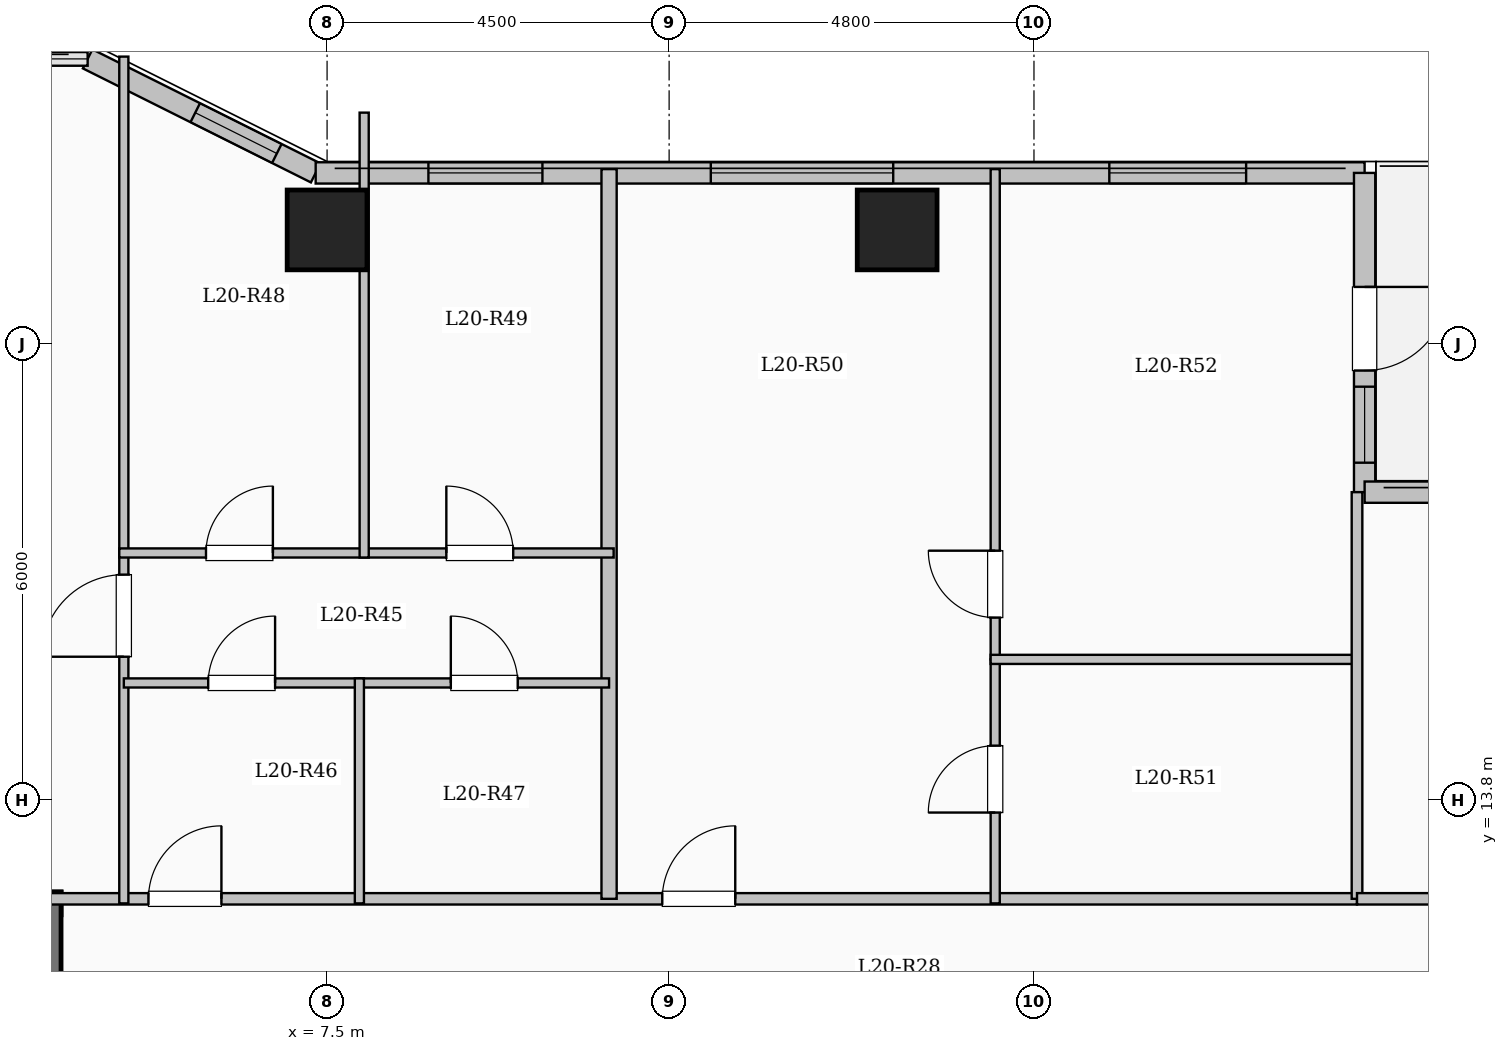
"""IFC4 building model, lengths in metres.
Left out: names, types, materials, properties, quantities, classifications, styles, units other than length and angle.
Written with IfcOpenShell. Run it as: python <this file> out.ifc"""

import sys

from ifc_helpers import new_model, si_unit, direction, frame, frame_2d, origin, origin_2d, place, context, subcontext, project, spatial, rectangle, extrude, element, fill, save


model = new_model("IFC4")
c1 = context("Model", 3, precision=1e-05, world=origin(), true_north=direction((0.0, 1.0)))
c2 = subcontext(c1, "Body", "Model", "MODEL_VIEW")
j1 = project(units=[si_unit("LENGTHUNIT", "METRE"), si_unit("PLANEANGLEUNIT", "RADIAN")], contexts=[c1])
p1 = place(None, origin())
s1 = spatial("IfcSite", under=j1, at=p1, CompositionType="ELEMENT")
p2 = place(p1, origin())
s2 = spatial("IfcBuilding", under=s1, at=p2, CompositionType="ELEMENT")
p3 = place(p2, frame((0.0, 0.0, 78.3)))
s3 = spatial("IfcBuildingStorey", under=s2, at=p3, CompositionType="ELEMENT", Elevation=78.3)
for number, where, z_axis, x_axis in (
    (1, (7.5, 21.3, 0.0), (0.0, 0.0, 1.0), (1.0, 0.0, 0.0)),
    (2, (15.0, 21.3, 0.0), (0.0, 0.0, 1.0), (1.0, 0.0, 0.0)),
):
    element("IfcColumn", number, at=place(p3, frame(where, z_axis=z_axis, x_axis=x_axis)), inside=s3, PredefinedType="COLUMN", context=c2, shape_type="SweptSolid", body=[
        extrude(rectangle(XDim=1.05, YDim=1.05, at=origin_2d()), origin(), (0.0, 0.0, 1.0), 3.35),
    ])
p4 = place(p3, frame((4.35, 23.55, 0.0), z_axis=(0.0, 0.0, 1.0), x_axis=(0.894427191, -0.4472135955, 0.0)))
e3 = element("IfcWall", 3, at=p4, inside=s3, PredefinedType="SOLIDWALL", context=c2, shape_type="SweptSolid", body=[
    extrude(rectangle(XDim=3.354, YDim=0.28, at=frame_2d((1.677, 0.0))), origin(), (0.0, 0.0, 1.0), 3.1),
])
p5 = place(p4, frame((1.583, 0.0, 0.95)))
e4 = element("IfcOpeningElement", 4, at=p5, cuts=e3, PredefinedType="OPENING", context=c2, shape_type="SweptSolid", body=[
    extrude(rectangle(XDim=1.2, YDim=1.5, at=frame_2d((0.6, 0.75))), frame((0.0, 0.15, 0.0), z_axis=(0.0, -1.0, 0.0), x_axis=(1.0, 0.0, 0.0)), (0.0, 0.0, 1.0), 0.3),
])
p6 = place(p3, frame((7.35, 22.05, 0.0), z_axis=(0.0, 0.0, 1.0), x_axis=(1.0, 0.0, 0.0)))
e5 = element("IfcWall", 5, at=p6, inside=s3, PredefinedType="SOLIDWALL", context=c2, shape_type="SweptSolid", body=[
    extrude(rectangle(XDim=13.8, YDim=0.28, at=frame_2d((6.9, 0.0))), origin(), (0.0, 0.0, 1.0), 3.1),
])
p7 = place(p6, frame((1.483, 0.0, 0.9)))
e6 = element("IfcOpeningElement", 6, at=p7, cuts=e5, PredefinedType="OPENING", context=c2, shape_type="SweptSolid", body=[
    extrude(rectangle(XDim=1.5, YDim=1.65, at=frame_2d((0.75, 0.825))), frame((0.0, 0.15, 0.0), z_axis=(0.0, -1.0, 0.0), x_axis=(1.0, 0.0, 0.0)), (0.0, 0.0, 1.0), 0.3),
])
p8 = place(p6, frame((5.198, 0.0, 0.9)))
e7 = element("IfcOpeningElement", 7, at=p8, cuts=e5, PredefinedType="OPENING", context=c2, shape_type="SweptSolid", body=[
    extrude(rectangle(XDim=2.4, YDim=1.8, at=frame_2d((1.2, 0.9))), frame((0.0, 0.15, 0.0), z_axis=(0.0, -1.0, 0.0), x_axis=(1.0, 0.0, 0.0)), (0.0, 0.0, 1.0), 0.3),
])
p9 = place(p6, frame((10.441, 0.0, 0.9)))
e8 = element("IfcOpeningElement", 8, at=p9, cuts=e5, PredefinedType="OPENING", context=c2, shape_type="SweptSolid", body=[
    extrude(rectangle(XDim=1.8, YDim=1.65, at=frame_2d((0.9, 0.825))), frame((0.0, 0.15, 0.0), z_axis=(0.0, -1.0, 0.0), x_axis=(1.0, 0.0, 0.0)), (0.0, 0.0, 1.0), 0.3),
])
p10 = place(p3, frame((21.15, 22.05, 0.0), z_axis=(0.0, 0.0, 1.0), x_axis=(0.0, -1.0, 0.0)))
e9 = element("IfcWall", 9, at=p10, inside=s3, PredefinedType="SOLIDWALL", context=c2, shape_type="SweptSolid", body=[
    extrude(rectangle(XDim=4.2, YDim=0.28, at=frame_2d((2.1, 0.0))), origin(), (0.0, 0.0, 1.0), 3.1),
])
p11 = place(p10, frame((1.5, 0.0, 0.0)))
e10 = element("IfcOpeningElement", 10, at=p11, cuts=e9, PredefinedType="OPENING", context=c2, shape_type="SweptSolid", body=[
    extrude(rectangle(XDim=1.1, YDim=2.2, at=frame_2d((0.55, 1.1))), frame((0.0, 0.15, 0.0), z_axis=(0.0, -1.0, 0.0), x_axis=(1.0, 0.0, 0.0)), (0.0, 0.0, 1.0), 0.3),
])
p12 = place(p10, frame((2.812, 0.0, 0.95)))
e11 = element("IfcOpeningElement", 11, at=p12, cuts=e9, PredefinedType="OPENING", context=c2, shape_type="SweptSolid", body=[
    extrude(rectangle(XDim=1.0, YDim=1.5, at=frame_2d((0.5, 0.75))), frame((0.0, 0.15, 0.0), z_axis=(0.0, -1.0, 0.0), x_axis=(1.0, 0.0, 0.0)), (0.0, 0.0, 1.0), 0.3),
])
p13 = place(p3, frame((21.15, 17.85, 0.0), z_axis=(0.0, 0.0, 1.0), x_axis=(1.0, 0.0, 0.0)))
e12 = element("IfcWall", 12, at=p13, inside=s3, PredefinedType="SOLIDWALL", context=c2, shape_type="SweptSolid", body=[
    extrude(rectangle(XDim=5.7, YDim=0.28, at=frame_2d((2.85, 0.0))), origin(), (0.0, 0.0, 1.0), 3.1),
])
p14 = place(p13, frame((1.825, 0.0, 0.9)))
e13 = element("IfcOpeningElement", 13, at=p14, cuts=e12, PredefinedType="OPENING", context=c2, shape_type="SweptSolid", body=[
    extrude(rectangle(XDim=2.0, YDim=1.7, at=frame_2d((1.0, 0.85))), frame((0.0, 0.15, 0.0), z_axis=(0.0, -1.0, 0.0), x_axis=(1.0, 0.0, 0.0)), (0.0, 0.0, 1.0), 0.3),
])
p15 = place(p3, frame((-4.0, 12.44, 0.0), z_axis=(0.0, 0.0, 1.0), x_axis=(1.0, 0.0, 0.0)))
e14 = element("IfcWall", 14, at=p15, inside=s3, PredefinedType="SHEAR", context=c2, shape_type="SweptSolid", body=[
    extrude(rectangle(XDim=8.0, YDim=0.3, at=frame_2d((4.0, 0.0))), origin(), (0.0, 0.0, 1.0), 3.35),
])
p16 = place(p3, frame((3.85, 9.0, 0.0), z_axis=(0.0, 0.0, 1.0), x_axis=(0.0, 1.0, 0.0)))
e15 = element("IfcWall", 15, at=p16, inside=s3, PredefinedType="SHEAR", context=c2, shape_type="SweptSolid", body=[
    extrude(rectangle(XDim=3.59, YDim=0.3, at=frame_2d((1.795, 0.0))), origin(), (0.0, 0.0, 1.0), 3.35),
])
p17 = place(p3, frame((3.85, 12.5, 0.0), z_axis=(0.0, 0.0, 1.0), x_axis=(1.0, 0.0, 0.0)))
e16 = element("IfcWall", 16, at=p17, inside=s3, PredefinedType="PARTITIONING", context=c2, shape_type="SweptSolid", body=[
    extrude(rectangle(XDim=17.2, YDim=0.15, at=frame_2d((8.6, 0.0))), origin(), (0.0, 0.0, 1.0), 3.1),
])
p18 = place(p17, frame((1.3, 0.0, 0.0)))
e17 = element("IfcOpeningElement", 17, at=p18, cuts=e16, PredefinedType="OPENING", context=c2, shape_type="SweptSolid", body=[
    extrude(rectangle(XDim=0.96, YDim=2.15, at=frame_2d((0.48, 1.075))), frame((0.0, 0.085, 0.0), z_axis=(0.0, -1.0, 0.0), x_axis=(1.0, 0.0, 0.0)), (0.0, 0.0, 1.0), 0.17),
])
p19 = place(p17, frame((8.06, 0.0, 0.0)))
e18 = element("IfcOpeningElement", 18, at=p19, cuts=e16, PredefinedType="OPENING", context=c2, shape_type="SweptSolid", body=[
    extrude(rectangle(XDim=0.96, YDim=2.15, at=frame_2d((0.48, 1.075))), frame((0.0, 0.085, 0.0), z_axis=(0.0, -1.0, 0.0), x_axis=(1.0, 0.0, 0.0)), (0.0, 0.0, 1.0), 0.17),
])
p20 = place(p3, frame((11.21, 12.5, 0.0), z_axis=(0.0, 0.0, 1.0), x_axis=(0.0, 1.0, 0.0)))
e19 = element("IfcWall", 19, at=p20, inside=s3, PredefinedType="SOLIDWALL", context=c2, shape_type="SweptSolid", body=[
    extrude(rectangle(XDim=9.6, YDim=0.2, at=frame_2d((4.8, 0.0))), origin(), (0.0, 0.0, 1.0), 3.1),
])
p21 = place(p3, frame((4.826, 12.44, 0.0), z_axis=(0.0, 0.0, 1.0), x_axis=(0.0, 1.0, 0.0)))
e20 = element("IfcWall", 20, at=p21, inside=s3, PredefinedType="PARTITIONING", context=c2, shape_type="SweptSolid", body=[
    extrude(rectangle(XDim=11.14, YDim=0.12, at=frame_2d((5.57, 0.0))), origin(), (0.0, 0.0, 1.0), 3.1),
])
p22 = place(p21, frame((3.245, 0.0, 0.0)))
e21 = element("IfcOpeningElement", 21, at=p22, cuts=e20, PredefinedType="OPENING", context=c2, shape_type="SweptSolid", body=[
    extrude(rectangle(XDim=1.08, YDim=2.15, at=frame_2d((0.54, 1.075))), frame((0.0, 0.07, 0.0), z_axis=(0.0, -1.0, 0.0), x_axis=(1.0, 0.0, 0.0)), (0.0, 0.0, 1.0), 0.14),
])
p23 = place(p3, frame((4.826, 15.34, 0.0), z_axis=(0.0, 0.0, 1.0), x_axis=(1.0, 0.0, 0.0)))
e22 = element("IfcWall", 22, at=p23, inside=s3, PredefinedType="PARTITIONING", context=c2, shape_type="SweptSolid", body=[
    extrude(rectangle(XDim=3.099, YDim=0.12, at=frame_2d((1.55, 0.0))), origin(), (0.0, 0.0, 1.0), 3.1),
])
p24 = place(p23, frame((1.11, 0.0, 0.0)))
e23 = element("IfcOpeningElement", 23, at=p24, cuts=e22, PredefinedType="OPENING", context=c2, shape_type="SweptSolid", body=[
    extrude(rectangle(XDim=0.88, YDim=2.1, at=frame_2d((0.44, 1.05))), frame((0.0, 0.07, 0.0), z_axis=(0.0, -1.0, 0.0), x_axis=(1.0, 0.0, 0.0)), (0.0, 0.0, 1.0), 0.14),
])
p25 = place(p3, frame((7.925, 15.34, 0.0), z_axis=(0.0, 0.0, 1.0), x_axis=(1.0, 0.0, 0.0)))
e24 = element("IfcWall", 24, at=p25, inside=s3, PredefinedType="PARTITIONING", context=c2, shape_type="SweptSolid", body=[
    extrude(rectangle(XDim=3.285, YDim=0.12, at=frame_2d((1.643, 0.0))), origin(), (0.0, 0.0, 1.0), 3.1),
])
p26 = place(p25, frame((1.203, 0.0, 0.0)))
e25 = element("IfcOpeningElement", 25, at=p26, cuts=e24, PredefinedType="OPENING", context=c2, shape_type="SweptSolid", body=[
    extrude(rectangle(XDim=0.88, YDim=2.1, at=frame_2d((0.44, 1.05))), frame((0.0, 0.07, 0.0), z_axis=(0.0, -1.0, 0.0), x_axis=(1.0, 0.0, 0.0)), (0.0, 0.0, 1.0), 0.14),
])
p27 = place(p3, frame((4.766, 17.05, 0.0), z_axis=(0.0, 0.0, 1.0), x_axis=(1.0, 0.0, 0.0)))
e26 = element("IfcWall", 26, at=p27, inside=s3, PredefinedType="PARTITIONING", context=c2, shape_type="SweptSolid", body=[
    extrude(rectangle(XDim=6.504, YDim=0.12, at=frame_2d((3.252, 0.0))), origin(), (0.0, 0.0, 1.0), 3.1),
])
p28 = place(p27, frame((1.141, 0.0, 0.0)))
e27 = element("IfcOpeningElement", 27, at=p28, cuts=e26, PredefinedType="OPENING", context=c2, shape_type="SweptSolid", body=[
    extrude(rectangle(XDim=0.88, YDim=2.1, at=frame_2d((0.44, 1.05))), frame((0.0, 0.07, 0.0), z_axis=(0.0, -1.0, 0.0), x_axis=(1.0, 0.0, 0.0)), (0.0, 0.0, 1.0), 0.14),
])
p29 = place(p27, frame((4.303, 0.0, 0.0)))
e28 = element("IfcOpeningElement", 28, at=p29, cuts=e26, PredefinedType="OPENING", context=c2, shape_type="SweptSolid", body=[
    extrude(rectangle(XDim=0.88, YDim=2.1, at=frame_2d((0.44, 1.05))), frame((0.0, 0.07, 0.0), z_axis=(0.0, -1.0, 0.0), x_axis=(1.0, 0.0, 0.0)), (0.0, 0.0, 1.0), 0.14),
])
p30 = place(p3, frame((7.925, 12.44, 0.0), z_axis=(0.0, 0.0, 1.0), x_axis=(0.0, 1.0, 0.0)))
e29 = element("IfcWall", 29, at=p30, inside=s3, PredefinedType="PARTITIONING", context=c2, shape_type="SweptSolid", body=[
    extrude(rectangle(XDim=2.96, YDim=0.12, at=frame_2d((1.48, 0.0))), origin(), (0.0, 0.0, 1.0), 2.435),
])
p31 = place(p3, frame((7.988, 16.99, 0.0), z_axis=(0.0, 0.0, 1.0), x_axis=(0.0, 1.0, 0.0)))
e30 = element("IfcWall", 30, at=p31, inside=s3, PredefinedType="PARTITIONING", context=c2, shape_type="SweptSolid", body=[
    extrude(rectangle(XDim=5.853, YDim=0.12, at=frame_2d((2.927, 0.0))), origin(), (0.0, 0.0, 1.0), 2.435),
])
p32 = place(p3, frame((16.29, 12.44, 0.0), z_axis=(0.0, 0.0, 1.0), x_axis=(0.0, 1.0, 0.0)))
e31 = element("IfcWall", 31, at=p32, inside=s3, PredefinedType="PARTITIONING", context=c2, shape_type="SweptSolid", body=[
    extrude(rectangle(XDim=3.21, YDim=0.12, at=frame_2d((1.605, 0.0))), origin(), (0.0, 0.0, 1.0), 3.1),
])
p33 = place(p32, frame((1.195, 0.0, 0.0)))
e32 = element("IfcOpeningElement", 32, at=p33, cuts=e31, PredefinedType="OPENING", context=c2, shape_type="SweptSolid", body=[
    extrude(rectangle(XDim=0.88, YDim=2.1, at=frame_2d((0.44, 1.05))), frame((0.0, 0.07, 0.0), z_axis=(0.0, -1.0, 0.0), x_axis=(1.0, 0.0, 0.0)), (0.0, 0.0, 1.0), 0.14),
])
p34 = place(p3, frame((16.29, 15.65, 0.0), z_axis=(0.0, 0.0, 1.0), x_axis=(0.0, 1.0, 0.0)))
e33 = element("IfcWall", 33, at=p34, inside=s3, PredefinedType="PARTITIONING", context=c2, shape_type="SweptSolid", body=[
    extrude(rectangle(XDim=6.45, YDim=0.12, at=frame_2d((3.225, 0.0))), origin(), (0.0, 0.0, 1.0), 3.1),
])
p35 = place(p34, frame((0.55, 0.0, 0.0)))
e34 = element("IfcOpeningElement", 34, at=p35, cuts=e33, PredefinedType="OPENING", context=c2, shape_type="SweptSolid", body=[
    extrude(rectangle(XDim=0.88, YDim=2.1, at=frame_2d((0.44, 1.05))), frame((0.0, 0.07, 0.0), z_axis=(0.0, -1.0, 0.0), x_axis=(1.0, 0.0, 0.0)), (0.0, 0.0, 1.0), 0.14),
])
p36 = place(p3, frame((16.23, 15.65, 0.0), z_axis=(0.0, 0.0, 1.0), x_axis=(1.0, 0.0, 0.0)))
e35 = element("IfcWall", 35, at=p36, inside=s3, PredefinedType="PARTITIONING", context=c2, shape_type="SweptSolid", body=[
    extrude(rectangle(XDim=4.88, YDim=0.12, at=frame_2d((2.44, 0.0))), origin(), (0.0, 0.0, 1.0), 3.1),
])
p37 = place(p3, frame((21.05, 12.5, 0.0), z_axis=(0.0, 0.0, 1.0), x_axis=(0.0, 1.0, 0.0)))
e36 = element("IfcWall", 36, at=p37, inside=s3, PredefinedType="PARTITIONING", context=c2, shape_type="SweptSolid", body=[
    extrude(rectangle(XDim=5.35, YDim=0.14, at=frame_2d((2.675, 0.0))), origin(), (0.0, 0.0, 1.0), 3.1),
])
p38 = place(p3, frame((21.05, 12.5, 0.0), z_axis=(0.0, 0.0, 1.0), x_axis=(1.0, 0.0, 0.0)))
e37 = element("IfcWall", 37, at=p38, inside=s3, PredefinedType="PARTITIONING", context=c2, shape_type="SweptSolid", body=[
    extrude(rectangle(XDim=5.83, YDim=0.15, at=frame_2d((2.915, 0.0))), origin(), (0.0, 0.0, 1.0), 3.1),
])
p39 = place(p38, frame((2.44, 0.0, 0.0)))
e38 = element("IfcOpeningElement", 38, at=p39, cuts=e37, PredefinedType="OPENING", context=c2, shape_type="SweptSolid", body=[
    extrude(rectangle(XDim=0.95, YDim=2.15, at=frame_2d((0.475, 1.075))), frame((0.0, 0.085, 0.0), z_axis=(0.0, -1.0, 0.0), x_axis=(1.0, 0.0, 0.0)), (0.0, 0.0, 1.0), 0.17),
])
p40 = place(p5, origin())
e39 = element("IfcWindow", 39, at=p40, inside=s3, PartitioningType="SINGLE_PANEL", PredefinedType="WINDOW", context=c2, shape_type="SweptSolid", body=[
    extrude(rectangle(XDim=1.2, YDim=1.5, at=frame_2d((0.6, 0.75))), frame((0.0, 0.03, 0.0), z_axis=(0.0, -1.0, 0.0), x_axis=(1.0, 0.0, 0.0)), (0.0, 0.0, 1.0), 0.06),
])
fill(e4, e39)
p41 = place(p7, origin())
e40 = element("IfcWindow", 40, at=p41, inside=s3, PartitioningType="SINGLE_PANEL", PredefinedType="WINDOW", context=c2, shape_type="SweptSolid", body=[
    extrude(rectangle(XDim=1.5, YDim=1.65, at=frame_2d((0.75, 0.825))), frame((0.0, 0.03, 0.0), z_axis=(0.0, -1.0, 0.0), x_axis=(1.0, 0.0, 0.0)), (0.0, 0.0, 1.0), 0.06),
])
fill(e6, e40)
p42 = place(p8, origin())
e41 = element("IfcWindow", 41, at=p42, inside=s3, PartitioningType="SINGLE_PANEL", PredefinedType="WINDOW", context=c2, shape_type="SweptSolid", body=[
    extrude(rectangle(XDim=2.4, YDim=1.8, at=frame_2d((1.2, 0.9))), frame((0.0, 0.03, 0.0), z_axis=(0.0, -1.0, 0.0), x_axis=(1.0, 0.0, 0.0)), (0.0, 0.0, 1.0), 0.06),
])
fill(e7, e41)
p43 = place(p9, origin())
e42 = element("IfcWindow", 42, at=p43, inside=s3, PartitioningType="SINGLE_PANEL", PredefinedType="WINDOW", context=c2, shape_type="SweptSolid", body=[
    extrude(rectangle(XDim=1.8, YDim=1.65, at=frame_2d((0.9, 0.825))), frame((0.0, 0.03, 0.0), z_axis=(0.0, -1.0, 0.0), x_axis=(1.0, 0.0, 0.0)), (0.0, 0.0, 1.0), 0.06),
])
fill(e8, e42)
p44 = place(p11, origin())
e43 = element("IfcDoor", 43, at=p44, inside=s3, OperationType="SINGLE_SWING_LEFT", PredefinedType="DOOR", context=c2, shape_type="SweptSolid", body=[
    extrude(rectangle(XDim=1.1, YDim=2.2, at=frame_2d((0.55, 1.1))), frame((0.0, 0.025, 0.0), z_axis=(0.0, -1.0, 0.0), x_axis=(1.0, 0.0, 0.0)), (0.0, 0.0, 1.0), 0.05),
])
fill(e10, e43)
p45 = place(p12, origin())
e44 = element("IfcWindow", 44, at=p45, inside=s3, PartitioningType="SINGLE_PANEL", PredefinedType="WINDOW", context=c2, shape_type="SweptSolid", body=[
    extrude(rectangle(XDim=1.0, YDim=1.5, at=frame_2d((0.5, 0.75))), frame((0.0, 0.03, 0.0), z_axis=(0.0, -1.0, 0.0), x_axis=(1.0, 0.0, 0.0)), (0.0, 0.0, 1.0), 0.06),
])
fill(e11, e44)
p46 = place(p18, origin())
e45 = element("IfcDoor", 45, at=p46, inside=s3, OperationType="SINGLE_SWING_RIGHT", PredefinedType="DOOR", context=c2, shape_type="SweptSolid", body=[
    extrude(rectangle(XDim=0.96, YDim=2.15, at=frame_2d((0.48, 1.075))), frame((0.0, 0.025, 0.0), z_axis=(0.0, -1.0, 0.0), x_axis=(1.0, 0.0, 0.0)), (0.0, 0.0, 1.0), 0.05),
])
fill(e17, e45)
p47 = place(p22, origin())
e46 = element("IfcDoor", 46, at=p47, inside=s3, OperationType="SINGLE_SWING_LEFT", PredefinedType="DOOR", context=c2, shape_type="SweptSolid", body=[
    extrude(rectangle(XDim=1.08, YDim=2.15, at=frame_2d((0.54, 1.075))), frame((0.0, 0.025, 0.0), z_axis=(0.0, -1.0, 0.0), x_axis=(1.0, 0.0, 0.0)), (0.0, 0.0, 1.0), 0.05),
])
fill(e21, e46)
p48 = place(p24, origin())
e47 = element("IfcDoor", 47, at=p48, inside=s3, OperationType="SINGLE_SWING_RIGHT", PredefinedType="DOOR", context=c2, shape_type="SweptSolid", body=[
    extrude(rectangle(XDim=0.88, YDim=2.1, at=frame_2d((0.44, 1.05))), frame((0.0, 0.025, 0.0), z_axis=(0.0, -1.0, 0.0), x_axis=(1.0, 0.0, 0.0)), (0.0, 0.0, 1.0), 0.05),
])
fill(e23, e47)
p49 = place(p26, origin())
e48 = element("IfcDoor", 48, at=p49, inside=s3, OperationType="SINGLE_SWING_LEFT", PredefinedType="DOOR", context=c2, shape_type="SweptSolid", body=[
    extrude(rectangle(XDim=0.88, YDim=2.1, at=frame_2d((0.44, 1.05))), frame((0.0, 0.025, 0.0), z_axis=(0.0, -1.0, 0.0), x_axis=(1.0, 0.0, 0.0)), (0.0, 0.0, 1.0), 0.05),
])
fill(e25, e48)
p50 = place(p28, origin())
e49 = element("IfcDoor", 49, at=p50, inside=s3, OperationType="SINGLE_SWING_RIGHT", PredefinedType="DOOR", context=c2, shape_type="SweptSolid", body=[
    extrude(rectangle(XDim=0.88, YDim=2.1, at=frame_2d((0.44, 1.05))), frame((0.0, 0.025, 0.0), z_axis=(0.0, -1.0, 0.0), x_axis=(1.0, 0.0, 0.0)), (0.0, 0.0, 1.0), 0.05),
])
fill(e27, e49)
p51 = place(p29, origin())
e50 = element("IfcDoor", 50, at=p51, inside=s3, OperationType="SINGLE_SWING_LEFT", PredefinedType="DOOR", context=c2, shape_type="SweptSolid", body=[
    extrude(rectangle(XDim=0.88, YDim=2.1, at=frame_2d((0.44, 1.05))), frame((0.0, 0.025, 0.0), z_axis=(0.0, -1.0, 0.0), x_axis=(1.0, 0.0, 0.0)), (0.0, 0.0, 1.0), 0.05),
])
fill(e28, e50)
p52 = place(p19, origin())
e51 = element("IfcDoor", 51, at=p52, inside=s3, OperationType="SINGLE_SWING_RIGHT", PredefinedType="DOOR", context=c2, shape_type="SweptSolid", body=[
    extrude(rectangle(XDim=0.96, YDim=2.15, at=frame_2d((0.48, 1.075))), frame((0.0, 0.025, 0.0), z_axis=(0.0, -1.0, 0.0), x_axis=(1.0, 0.0, 0.0)), (0.0, 0.0, 1.0), 0.05),
])
fill(e18, e51)
p53 = place(p33, origin())
e52 = element("IfcDoor", 52, at=p53, inside=s3, OperationType="SINGLE_SWING_LEFT", PredefinedType="DOOR", context=c2, shape_type="SweptSolid", body=[
    extrude(rectangle(XDim=0.88, YDim=2.1, at=frame_2d((0.44, 1.05))), frame((0.0, 0.025, 0.0), z_axis=(0.0, -1.0, 0.0), x_axis=(1.0, 0.0, 0.0)), (0.0, 0.0, 1.0), 0.05),
])
fill(e32, e52)
p54 = place(p35, origin())
e53 = element("IfcDoor", 53, at=p54, inside=s3, OperationType="SINGLE_SWING_RIGHT", PredefinedType="DOOR", context=c2, shape_type="SweptSolid", body=[
    extrude(rectangle(XDim=0.88, YDim=2.1, at=frame_2d((0.44, 1.05))), frame((0.0, 0.025, 0.0), z_axis=(0.0, -1.0, 0.0), x_axis=(1.0, 0.0, 0.0)), (0.0, 0.0, 1.0), 0.05),
])
fill(e34, e53)
save(model, sys.argv[1])
